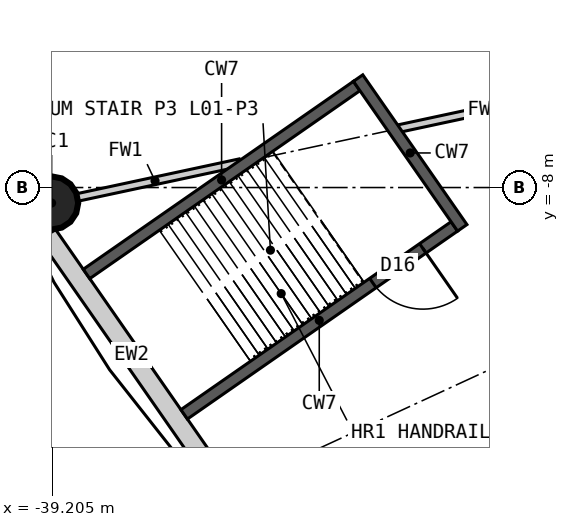
"""IFC4 building model, lengths in metres.
Left out: names, types, materials, properties, quantities, classifications, styles, units other than length and angle.
Written with IfcOpenShell. Run it as: python <this file> out.ifc"""

import sys

from ifc_helpers import new_model, si_unit, direction, frame, frame_2d, origin, origin_2d, place, context, subcontext, project, spatial, rectangle, circle, extrude, element, fill, save


model = new_model("IFC4")
c1 = context("Model", 3, precision=1e-05, world=origin(), true_north=direction((0.0, 1.0)))
c2 = subcontext(c1, "Body", "Model", "MODEL_VIEW")
j1 = project(units=[si_unit("LENGTHUNIT", "METRE"), si_unit("PLANEANGLEUNIT", "RADIAN")], contexts=[c1])
p1 = place(None, origin())
s1 = spatial("IfcSite", under=j1, at=p1, CompositionType="ELEMENT")
p2 = place(p1, origin())
s2 = spatial("IfcBuilding", under=s1, at=p2, CompositionType="ELEMENT")
p3 = place(p2, frame((0.0, 0.0, 7.2)))
s3 = spatial("IfcBuildingStorey", under=s2, at=p3, CompositionType="ELEMENT", Elevation=7.2)
p4 = place(p3, frame((-39.218, -8.407, 0.0), z_axis=(0.0, 0.0, 1.0), x_axis=(1.0, 0.0, 0.0)))
e1 = element("IfcColumn", 1, at=p4, inside=s3, PredefinedType="COLUMN", context=c2, shape_type="SweptSolid", body=[
    extrude(circle(Radius=0.7, at=origin_2d()), origin(), (0.0, 0.0, 1.0), 6.6),
])
p5 = place(p3, frame((-39.32, -9.244, 0.0), z_axis=(0.0, 0.0, 1.0), x_axis=(0.571029335057, -0.820929655028, 0.0)))
e2 = element("IfcWall", 2, at=p5, inside=s3, PredefinedType="SOLIDWALL", context=c2, shape_type="SweptSolid", body=[
    extrude(rectangle(XDim=7.733, YDim=0.5, at=frame_2d((3.866, 0.0))), origin(), (0.0, 0.0, 1.0), 6.35),
])
p6 = place(p3, frame((-25.527, -5.472, 0.0), z_axis=(0.0, 0.0, 1.0), x_axis=(-0.977787143577, -0.209600338396, 0.0)))
e3 = element("IfcWall", 3, at=p6, inside=s3, PredefinedType="PARTITIONING", context=c2, shape_type="SweptSolid", body=[
    extrude(rectangle(XDim=4.68, YDim=0.2, at=frame_2d((2.34, 0.0))), origin(), (0.0, 0.0, 1.0), 5.45),
])
p7 = place(p3, frame((-34.263, -7.345, 0.0), z_axis=(0.0, 0.0, 1.0), x_axis=(-0.977794589892, -0.209565598271, 0.0)))
e4 = element("IfcWall", 4, at=p7, inside=s3, PredefinedType="PARTITIONING", context=c2, shape_type="SweptSolid", body=[
    extrude(rectangle(XDim=4.567, YDim=0.2, at=frame_2d((2.283, 0.0))), origin(), (0.0, 0.0, 1.0), 5.45),
])
p8 = place(p3, frame((-38.299, -10.274, 0.0), z_axis=(0.0, 0.0, 1.0), x_axis=(0.820936803751, 0.571019057692, 0.0)))
e5 = element("IfcWall", 5, at=p8, inside=s3, PredefinedType="SHEAR", context=c2, shape_type="SweptSolid", body=[
    extrude(rectangle(XDim=8.66, YDim=0.3, at=frame_2d((4.33, 0.0))), origin(), (0.0, 0.0, 1.0), 6.6),
])
p9 = place(p3, frame((-35.729, -13.968, 0.0), z_axis=(0.0, 0.0, 1.0), x_axis=(0.82092761123, 0.571032273274, 0.0)))
e6 = element("IfcWall", 6, at=p9, inside=s3, PredefinedType="SHEAR", context=c2, shape_type="SweptSolid", body=[
    extrude(rectangle(XDim=8.66, YDim=0.3, at=frame_2d((4.33, 0.0))), origin(), (0.0, 0.0, 1.0), 6.6),
])
p10 = place(p9, frame((6.05, 0.0, 0.0)))
e7 = element("IfcOpeningElement", 7, at=p10, cuts=e6, PredefinedType="OPENING", context=c2, shape_type="SweptSolid", body=[
    extrude(rectangle(XDim=1.6, YDim=2.1, at=frame_2d((0.8, 1.05))), frame((0.0, 0.16, 0.0), z_axis=(0.0, -1.0, 0.0), x_axis=(1.0, 0.0, 0.0)), (0.0, 0.0, 1.0), 0.32),
])
p11 = place(p3, frame((-31.153, -5.12, 0.0), z_axis=(0.0, 0.0, 1.0), x_axis=(0.571036173178, -0.820924898467, 0.0)))
e8 = element("IfcWall", 8, at=p11, inside=s3, PredefinedType="SHEAR", context=c2, shape_type="SweptSolid", body=[
    extrude(rectangle(XDim=4.8, YDim=0.3, at=frame_2d((2.4, 0.0))), origin(), (0.0, 0.0, 1.0), 6.6),
])
p12 = place(p10, origin())
e9 = element("IfcDoor", 9, at=p12, inside=s3, OperationType="SINGLE_SWING_RIGHT", PredefinedType="DOOR", context=c2, shape_type="SweptSolid", body=[
    extrude(rectangle(XDim=1.6, YDim=2.1, at=frame_2d((0.8, 1.05))), frame((0.0, 0.025, 0.0), z_axis=(0.0, -1.0, 0.0), x_axis=(1.0, 0.0, 0.0)), (0.0, 0.0, 1.0), 0.05),
])
fill(e7, e9)
save(model, sys.argv[1])
